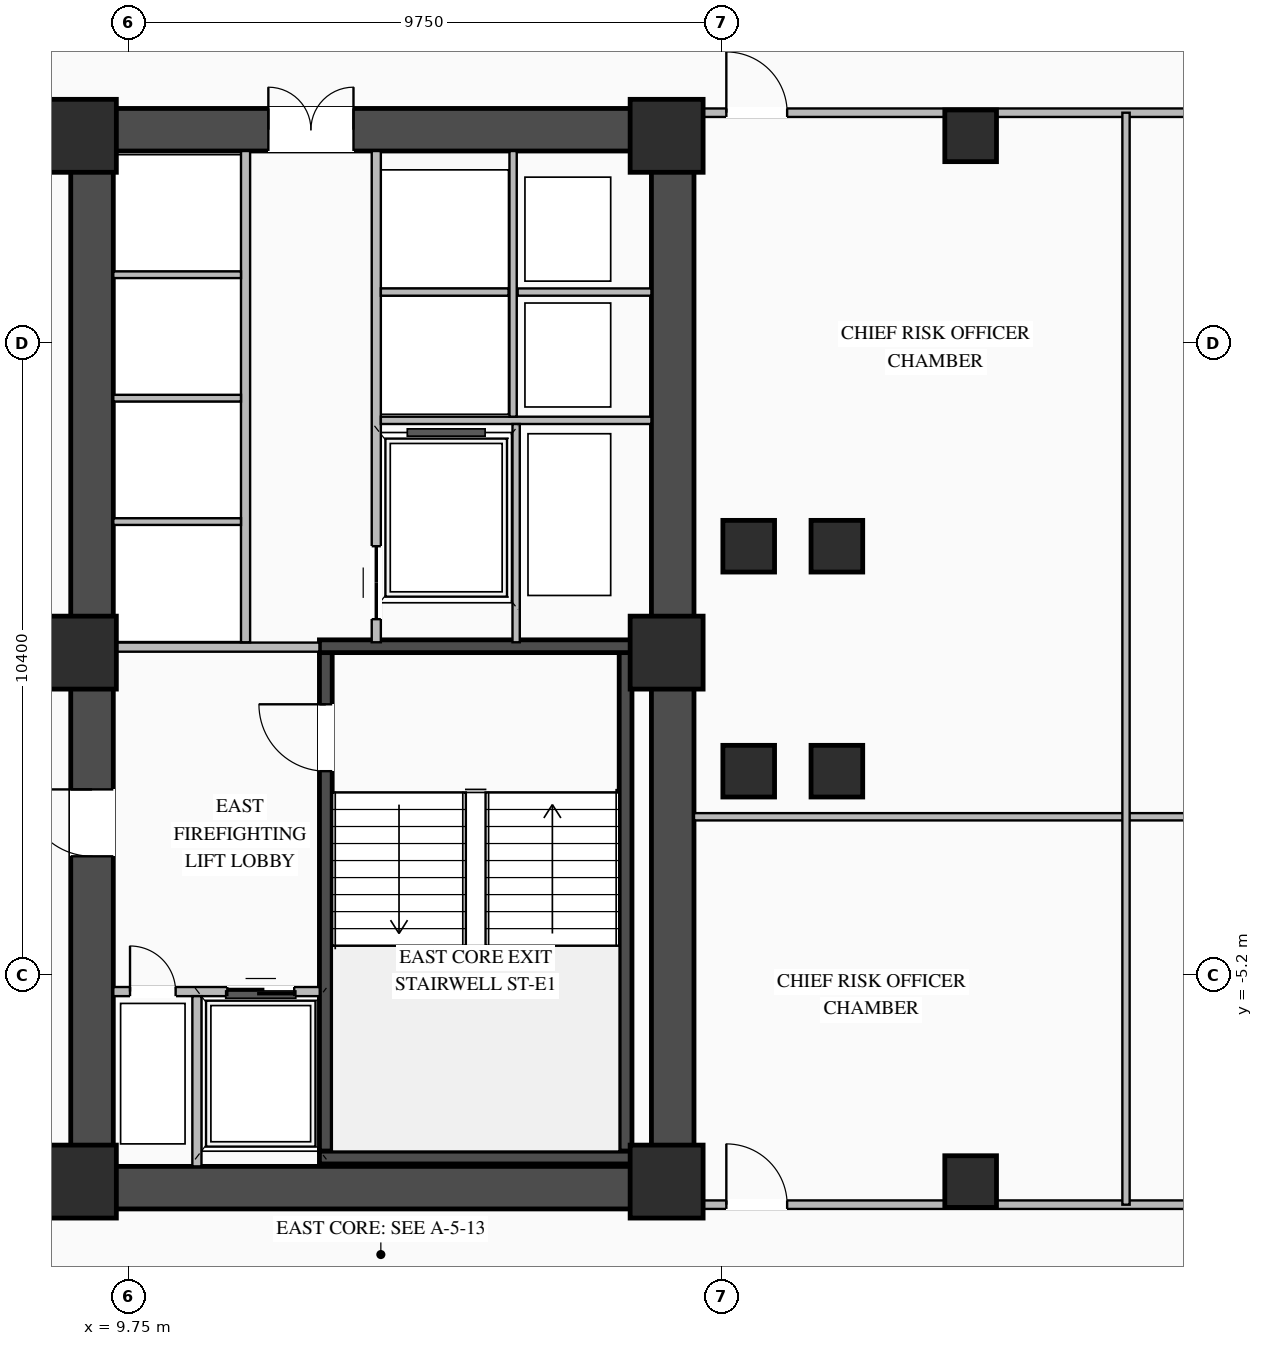
"""IFC4 building model, lengths in metres.
Left out: names, types, materials, properties, quantities, classifications, styles, units other than length and angle.
Written with IfcOpenShell. Run it as: python <this file> out.ifc"""

import sys

from ifc_helpers import new_model, si_unit, direction, frame, frame_2d, origin, origin_2d, place, context, subcontext, project, spatial, rectangle, i_section, extrude, element, fill, save


model = new_model("IFC4")
c1 = context("Model", 3, precision=1e-05, world=origin(), true_north=direction((0.0, 1.0)))
c2 = subcontext(c1, "Body", "Model", "MODEL_VIEW")
j1 = project(units=[si_unit("LENGTHUNIT", "METRE"), si_unit("PLANEANGLEUNIT", "RADIAN")], contexts=[c1])
p1 = place(None, origin())
s1 = spatial("IfcSite", under=j1, at=p1, CompositionType="ELEMENT")
p2 = place(p1, origin())
s2 = spatial("IfcBuilding", under=s1, at=p2, CompositionType="ELEMENT")
p3 = place(p2, frame((0.0, 0.0, 58.8)))
s3 = spatial("IfcBuildingStorey", under=s2, at=p3, CompositionType="ELEMENT", Elevation=58.8)
p4 = place(p3, frame((8.8, -8.7, 0.0), z_axis=(0.0, 0.0, 1.0), x_axis=(1.0, 0.0, 0.0)))
e1 = element("IfcWall", 1, at=p4, inside=s3, PredefinedType="SHEAR", context=c2, shape_type="SweptSolid", body=[
    extrude(rectangle(XDim=10.25, YDim=0.7, at=frame_2d((5.125, 0.0))), origin(), (0.0, 0.0, 1.0), 3.27),
])
p5 = place(p3, frame((8.8, 8.7, 0.0), z_axis=(0.0, 0.0, 1.0), x_axis=(1.0, 0.0, 0.0)))
e2 = element("IfcWall", 2, at=p5, inside=s3, PredefinedType="SHEAR", context=c2, shape_type="SweptSolid", body=[
    extrude(rectangle(XDim=10.25, YDim=0.7, at=frame_2d((5.125, 0.0))), origin(), (0.0, 0.0, 1.0), 3.27),
])
p6 = place(p5, frame((3.25, 0.0, 0.0)))
e3 = element("IfcOpeningElement", 3, at=p6, cuts=e2, PredefinedType="OPENING", context=c2, shape_type="SweptSolid", body=[
    extrude(rectangle(XDim=1.4, YDim=2.05, at=frame_2d((0.7, 1.025))), frame((0.0, 0.36, 0.0), z_axis=(0.0, -1.0, 0.0), x_axis=(1.0, 0.0, 0.0)), (0.0, 0.0, 1.0), 0.72),
])
p7 = place(p3, frame((9.15, -8.35, 0.0), z_axis=(0.0, 0.0, 1.0), x_axis=(0.0, 1.0, 0.0)))
e4 = element("IfcWall", 4, at=p7, inside=s3, PredefinedType="SHEAR", context=c2, shape_type="SweptSolid", body=[
    extrude(rectangle(XDim=16.7, YDim=0.7, at=frame_2d((8.35, 0.0))), origin(), (0.0, 0.0, 1.0), 3.27),
])
p8 = place(p7, frame((5.1, 0.0, 0.0)))
e5 = element("IfcOpeningElement", 5, at=p8, cuts=e4, PredefinedType="OPENING", context=c2, shape_type="SweptSolid", body=[
    extrude(rectangle(XDim=1.1, YDim=2.08, at=frame_2d((0.55, 1.04))), frame((0.0, 0.36, 0.0), z_axis=(0.0, -1.0, 0.0), x_axis=(1.0, 0.0, 0.0)), (0.0, 0.0, 1.0), 0.72),
])
p9 = place(p3, frame((18.7, -8.35, 0.0), z_axis=(0.0, 0.0, 1.0), x_axis=(0.0, 1.0, 0.0)))
e6 = element("IfcWall", 6, at=p9, inside=s3, PredefinedType="SHEAR", context=c2, shape_type="SweptSolid", body=[
    extrude(rectangle(XDim=16.7, YDim=0.7, at=frame_2d((8.35, 0.0))), origin(), (0.0, 0.0, 1.0), 3.27),
])
p10 = place(p3, frame((12.995, -8.1, 0.0), z_axis=(0.0, 0.0, 1.0), x_axis=(0.0, 1.0, 0.0)))
e7 = element("IfcWall", 7, at=p10, inside=s3, PredefinedType="SHEAR", context=c2, shape_type="SweptSolid", body=[
    extrude(rectangle(XDim=8.2, YDim=0.21, at=frame_2d((4.1, 0.0))), origin(), (0.0, 0.0, 1.0), 3.27),
])
p11 = place(p10, frame((6.25, 0.0, 0.0)))
e8 = element("IfcOpeningElement", 8, at=p11, cuts=e7, PredefinedType="OPENING", context=c2, shape_type="SweptSolid", body=[
    extrude(rectangle(XDim=1.1, YDim=2.15, at=frame_2d((0.55, 1.075))), frame((0.0, 0.115, 0.0), z_axis=(0.0, -1.0, 0.0), x_axis=(1.0, 0.0, 0.0)), (0.0, 0.0, 1.0), 0.23),
])
p12 = place(p3, frame((17.925, -8.1, 0.0), z_axis=(0.0, 0.0, 1.0), x_axis=(0.0, 1.0, 0.0)))
e9 = element("IfcWall", 9, at=p12, inside=s3, PredefinedType="SHEAR", context=c2, shape_type="SweptSolid", body=[
    extrude(rectangle(XDim=8.2, YDim=0.21, at=frame_2d((4.1, 0.0))), origin(), (0.0, 0.0, 1.0), 3.27),
])
for number, where, z_axis, x_axis in (
    (10, (12.89, -8.205, 0.0), (0.0, 0.0, 1.0), (1.0, 0.0, 0.0)),
    (11, (18.03, 0.205, 0.0), (0.0, 0.0, 1.0), (-1.0, 0.0, 0.0)),
):
    element("IfcWall", number, at=place(p3, frame(where, z_axis=z_axis, x_axis=x_axis)), inside=s3, PredefinedType="SHEAR", context=c2, shape_type="SweptSolid", body=[
        extrude(rectangle(XDim=5.14, YDim=0.21, at=frame_2d((2.57, 0.0))), origin(), (0.0, 0.0, 1.0), 3.27),
    ])
for number, where, z_axis, x_axis in (
    (12, (8.95, -8.6, 0.0), (0.0, 0.0, 1.0), (1.0, 0.0, 0.0)),
    (13, (8.95, 0.1, 0.0), (0.0, 0.0, 1.0), (1.0, 0.0, 0.0)),
    (14, (8.95, 8.6, 0.0), (0.0, 0.0, 1.0), (1.0, 0.0, 0.0)),
    (15, (18.6, -8.6, 0.0), (0.0, 0.0, 1.0), (1.0, 0.0, 0.0)),
    (16, (18.6, 0.1, 0.0), (0.0, 0.0, 1.0), (1.0, 0.0, 0.0)),
    (17, (18.6, 8.6, 0.0), (0.0, 0.0, 1.0), (1.0, 0.0, 0.0)),
):
    element("IfcColumn", number, at=place(p3, frame(where, z_axis=z_axis, x_axis=x_axis)), inside=s3, PredefinedType="COLUMN", context=c2, shape_type="SweptSolid", body=[
        extrude(rectangle(XDim=1.2, YDim=1.2, at=origin_2d()), origin(), (0.0, 0.0, 1.0), 3.45),
    ])
for number, where, z_axis, x_axis in (
    (18, (19.95, -1.85, 0.0), (0.0, 0.0, 1.0), (1.0, 0.0, 0.0)),
    (19, (19.95, 1.85, 0.0), (0.0, 0.0, 1.0), (1.0, 0.0, 0.0)),
    (20, (21.4, -1.85, 0.0), (0.0, 0.0, 1.0), (1.0, 0.0, 0.0)),
    (21, (21.4, 1.85, 0.0), (0.0, 0.0, 1.0), (1.0, 0.0, 0.0)),
    (22, (23.6, -8.6, 0.0), (0.0, 0.0, 1.0), (1.0, 0.0, 0.0)),
    (23, (23.6, 8.6, 0.0), (0.0, 0.0, 1.0), (1.0, 0.0, 0.0)),
):
    element("IfcColumn", number, at=place(p3, frame(where, z_axis=z_axis, x_axis=x_axis)), inside=s3, PredefinedType="COLUMN", context=c2, shape_type="SweptSolid", body=[
        extrude(i_section(OverallWidth=0.85, OverallDepth=0.85, WebThickness=0.032, FlangeThickness=0.048, at=origin_2d()), origin(), (0.0, 0.0, 1.0), 3.45),
    ])
p13 = place(p3, frame((9.5, -5.475, 0.0), z_axis=(0.0, 0.0, 1.0), x_axis=(1.0, 0.0, 0.0)))
e24 = element("IfcWall", 24, at=p13, inside=s3, PredefinedType="STANDARD", context=c2, shape_type="SweptSolid", body=[
    extrude(rectangle(XDim=3.395, YDim=0.15, at=frame_2d((1.698, 0.0))), origin(), (0.0, 0.0, 1.0), 3.25),
])
p14 = place(p13, frame((1.875, 0.0, 0.0)))
e25 = element("IfcOpeningElement", 25, at=p14, cuts=e24, PredefinedType="OPENING", context=c2, shape_type="SweptSolid", body=[
    extrude(rectangle(XDim=1.1, YDim=2.15, at=frame_2d((0.55, 1.075))), frame((0.0, 0.085, 0.0), z_axis=(0.0, -1.0, 0.0), x_axis=(1.0, 0.0, 0.0)), (0.0, 0.0, 1.0), 0.17),
])
p15 = place(p13, frame((0.275, 0.0, 0.0)))
e26 = element("IfcOpeningElement", 26, at=p15, cuts=e24, PredefinedType="OPENING", context=c2, shape_type="SweptSolid", body=[
    extrude(rectangle(XDim=0.75, YDim=2.05, at=frame_2d((0.375, 1.025))), frame((0.0, 0.085, 0.0), z_axis=(0.0, -1.0, 0.0), x_axis=(1.0, 0.0, 0.0)), (0.0, 0.0, 1.0), 0.17),
])
p16 = place(p3, frame((10.875, -8.35, 0.0), z_axis=(0.0, 0.0, 1.0), x_axis=(0.0, 1.0, 0.0)))
e27 = element("IfcWall", 27, at=p16, inside=s3, PredefinedType="STANDARD", context=c2, shape_type="SweptSolid", body=[
    extrude(rectangle(XDim=2.8, YDim=0.15, at=frame_2d((1.4, 0.0))), origin(), (0.0, 0.0, 1.0), 3.25),
])
p17 = place(p3, frame((9.5, 0.19, 0.0), z_axis=(0.0, 0.0, 1.0), x_axis=(1.0, 0.0, 0.0)))
e28 = element("IfcWall", 28, at=p17, inside=s3, PredefinedType="STANDARD", context=c2, shape_type="SweptSolid", body=[
    extrude(rectangle(XDim=3.39, YDim=0.15, at=frame_2d((1.695, 0.0))), origin(), (0.0, 0.0, 1.0), 2.645),
])
p18 = place(p3, frame((11.675, 0.27, 0.0), z_axis=(0.0, 0.0, 1.0), x_axis=(0.0, 1.0, 0.0)))
e29 = element("IfcWall", 29, at=p18, inside=s3, PredefinedType="STANDARD", context=c2, shape_type="SweptSolid", body=[
    extrude(rectangle(XDim=8.08, YDim=0.15, at=frame_2d((4.04, 0.0))), origin(), (0.0, 0.0, 1.0), 3.25),
])
for number, where, z_axis, x_axis in (
    (30, (9.5, 2.255, 0.0), (0.0, 0.0, 1.0), (1.0, 0.0, 0.0)),
    (31, (9.5, 4.285, 0.0), (0.0, 0.0, 1.0), (1.0, 0.0, 0.0)),
    (32, (9.5, 6.315, 0.0), (0.0, 0.0, 1.0), (1.0, 0.0, 0.0)),
):
    element("IfcWall", number, at=place(p3, frame(where, z_axis=z_axis, x_axis=x_axis)), inside=s3, PredefinedType="STANDARD", context=c2, shape_type="SweptSolid", body=[
        extrude(rectangle(XDim=2.1, YDim=0.11, at=frame_2d((1.05, 0.0))), origin(), (0.0, 0.0, 1.0), 3.25),
    ])
p19 = place(p3, frame((13.825, 0.27, 0.0), z_axis=(0.0, 0.0, 1.0), x_axis=(0.0, 1.0, 0.0)))
e33 = element("IfcWall", 33, at=p19, inside=s3, PredefinedType="STANDARD", context=c2, shape_type="SweptSolid", body=[
    extrude(rectangle(XDim=8.08, YDim=0.15, at=frame_2d((4.04, 0.0))), origin(), (0.0, 0.0, 1.0), 3.25),
])
p20 = place(p19, frame((0.38, 0.0, 0.0)))
e34 = element("IfcOpeningElement", 34, at=p20, cuts=e33, PredefinedType="OPENING", context=c2, shape_type="SweptSolid", body=[
    extrude(rectangle(XDim=1.2, YDim=2.1, at=frame_2d((0.6, 1.05))), frame((0.0, 0.085, 0.0), z_axis=(0.0, -1.0, 0.0), x_axis=(1.0, 0.0, 0.0)), (0.0, 0.0, 1.0), 0.17),
])
p21 = place(p3, frame((13.9, 3.92, 0.0), z_axis=(0.0, 0.0, 1.0), x_axis=(1.0, 0.0, 0.0)))
e35 = element("IfcWall", 35, at=p21, inside=s3, PredefinedType="STANDARD", context=c2, shape_type="SweptSolid", body=[
    extrude(rectangle(XDim=4.45, YDim=0.12, at=frame_2d((2.225, 0.0))), origin(), (0.0, 0.0, 1.0), 3.25),
])
p22 = place(p3, frame((16.15, 6.03, 0.0), z_axis=(0.0, 0.0, 1.0), x_axis=(1.0, 0.0, 0.0)))
e36 = element("IfcWall", 36, at=p22, inside=s3, PredefinedType="STANDARD", context=c2, shape_type="SweptSolid", body=[
    extrude(rectangle(XDim=2.2, YDim=0.12, at=frame_2d((1.1, 0.0))), origin(), (0.0, 0.0, 1.0), 3.25),
])
p23 = place(p3, frame((16.075, 3.98, 0.0), z_axis=(0.0, 0.0, 1.0), x_axis=(0.0, 1.0, 0.0)))
e37 = element("IfcWall", 37, at=p23, inside=s3, PredefinedType="STANDARD", context=c2, shape_type="SweptSolid", body=[
    extrude(rectangle(XDim=4.37, YDim=0.12, at=frame_2d((2.185, 0.0))), origin(), (0.0, 0.0, 1.0), 3.25),
])
p24 = place(p3, frame((13.9, 6.03, 0.0), z_axis=(0.0, 0.0, 1.0), x_axis=(1.0, 0.0, 0.0)))
e38 = element("IfcWall", 38, at=p24, inside=s3, PredefinedType="STANDARD", context=c2, shape_type="SweptSolid", body=[
    extrude(rectangle(XDim=2.1, YDim=0.12, at=frame_2d((1.05, 0.0))), origin(), (0.0, 0.0, 1.0), 3.25),
])
p25 = place(p3, frame((16.125, 0.27, 0.0), z_axis=(0.0, 0.0, 1.0), x_axis=(0.0, 1.0, 0.0)))
e39 = element("IfcWall", 39, at=p25, inside=s3, PredefinedType="STANDARD", context=c2, shape_type="SweptSolid", body=[
    extrude(rectangle(XDim=3.59, YDim=0.12, at=frame_2d((1.795, 0.0))), origin(), (0.0, 0.0, 1.0), 3.25),
])
p26 = place(p3, frame((19.05, 8.98, 0.0), z_axis=(0.0, 0.0, 1.0), x_axis=(1.0, 0.0, 0.0)))
e40 = element("IfcWall", 40, at=p26, inside=s3, PredefinedType="STANDARD", context=c2, shape_type="SweptSolid", body=[
    extrude(rectangle(XDim=16.57, YDim=0.14, at=frame_2d((8.285, 0.0))), origin(), (0.0, 0.0, 1.0), 3.25),
])
p27 = place(p26, frame((0.532, 0.0, 0.0)))
e41 = element("IfcOpeningElement", 41, at=p27, cuts=e40, PredefinedType="OPENING", context=c2, shape_type="SweptSolid", body=[
    extrude(rectangle(XDim=1.0, YDim=2.08, at=frame_2d((0.5, 1.04))), frame((0.0, 0.08, 0.0), z_axis=(0.0, -1.0, 0.0), x_axis=(1.0, 0.0, 0.0)), (0.0, 0.0, 1.0), 0.16),
])
p28 = place(p26, frame((11.208, 0.0, 0.0)))
e42 = element("IfcOpeningElement", 42, at=p28, cuts=e40, PredefinedType="OPENING", context=c2, shape_type="SweptSolid", body=[
    extrude(rectangle(XDim=1.0, YDim=2.08, at=frame_2d((0.5, 1.04))), frame((0.0, 0.08, 0.0), z_axis=(0.0, -1.0, 0.0), x_axis=(1.0, 0.0, 0.0)), (0.0, 0.0, 1.0), 0.16),
])
p29 = place(p3, frame((19.05, -8.98, 0.0), z_axis=(0.0, 0.0, 1.0), x_axis=(1.0, 0.0, 0.0)))
e43 = element("IfcWall", 43, at=p29, inside=s3, PredefinedType="STANDARD", context=c2, shape_type="SweptSolid", body=[
    extrude(rectangle(XDim=16.57, YDim=0.14, at=frame_2d((8.285, 0.0))), origin(), (0.0, 0.0, 1.0), 3.25),
])
p30 = place(p29, frame((0.532, 0.0, 0.0)))
e44 = element("IfcOpeningElement", 44, at=p30, cuts=e43, PredefinedType="OPENING", context=c2, shape_type="SweptSolid", body=[
    extrude(rectangle(XDim=1.0, YDim=2.08, at=frame_2d((0.5, 1.04))), frame((0.0, 0.08, 0.0), z_axis=(0.0, -1.0, 0.0), x_axis=(1.0, 0.0, 0.0)), (0.0, 0.0, 1.0), 0.16),
])
p31 = place(p29, frame((11.208, 0.0, 0.0)))
e45 = element("IfcOpeningElement", 45, at=p31, cuts=e43, PredefinedType="OPENING", context=c2, shape_type="SweptSolid", body=[
    extrude(rectangle(XDim=1.0, YDim=2.08, at=frame_2d((0.5, 1.04))), frame((0.0, 0.08, 0.0), z_axis=(0.0, -1.0, 0.0), x_axis=(1.0, 0.0, 0.0)), (0.0, 0.0, 1.0), 0.16),
])
p32 = place(p3, frame((19.05, -2.6, 0.0), z_axis=(0.0, 0.0, 1.0), x_axis=(1.0, 0.0, 0.0)))
e46 = element("IfcWall", 46, at=p32, inside=s3, PredefinedType="STANDARD", context=c2, shape_type="SweptSolid", body=[
    extrude(rectangle(XDim=16.57, YDim=0.12, at=frame_2d((8.285, 0.0))), origin(), (0.0, 0.0, 1.0), 3.25),
])
p33 = place(p3, frame((26.155, -8.98, 0.0), z_axis=(0.0, 0.0, 1.0), x_axis=(0.0, 1.0, 0.0)))
e47 = element("IfcWall", 47, at=p33, inside=s3, PredefinedType="STANDARD", context=c2, shape_type="SweptSolid", body=[
    extrude(rectangle(XDim=17.96, YDim=0.12, at=frame_2d((8.98, 0.0))), origin(), (0.0, 0.0, 1.0), 3.25),
])
p34 = place(p11, origin())
e48 = element("IfcDoor", 48, at=p34, inside=s3, OperationType="SINGLE_SWING_RIGHT", PredefinedType="DOOR", context=c2, shape_type="SweptSolid", body=[
    extrude(rectangle(XDim=1.1, YDim=2.15, at=frame_2d((0.55, 1.075))), frame((0.0, 0.025, 0.0), z_axis=(0.0, -1.0, 0.0), x_axis=(1.0, 0.0, 0.0)), (0.0, 0.0, 1.0), 0.05),
])
fill(e8, e48)
p35 = place(p14, origin())
e49 = element("IfcDoor", 49, at=p35, inside=s3, OperationType="DOUBLE_DOOR_SLIDING", PredefinedType="DOOR", context=c2, shape_type="SweptSolid", body=[
    extrude(rectangle(XDim=1.1, YDim=2.15, at=frame_2d((0.55, 1.075))), frame((0.0, 0.025, 0.0), z_axis=(0.0, -1.0, 0.0), x_axis=(1.0, 0.0, 0.0)), (0.0, 0.0, 1.0), 0.05),
])
fill(e25, e49)
p36 = place(p15, origin())
e50 = element("IfcDoor", 50, at=p36, inside=s3, OperationType="SINGLE_SWING_LEFT", PredefinedType="DOOR", context=c2, shape_type="SweptSolid", body=[
    extrude(rectangle(XDim=0.75, YDim=2.05, at=frame_2d((0.375, 1.025))), frame((0.0, 0.025, 0.0), z_axis=(0.0, -1.0, 0.0), x_axis=(1.0, 0.0, 0.0)), (0.0, 0.0, 1.0), 0.05),
])
fill(e26, e50)
p37 = place(p8, origin())
e51 = element("IfcDoor", 51, at=p37, inside=s3, OperationType="SINGLE_SWING_RIGHT", PredefinedType="DOOR", context=c2, shape_type="SweptSolid", body=[
    extrude(rectangle(XDim=1.1, YDim=2.08, at=frame_2d((0.55, 1.04))), frame((0.0, -0.255, 0.0), z_axis=(0.0, -1.0, 0.0), x_axis=(1.0, 0.0, 0.0)), (0.0, 0.0, 1.0), 0.05),
])
fill(e5, e51)
p38 = place(p6, origin())
e52 = element("IfcDoor", 52, at=p38, inside=s3, OperationType="DOUBLE_DOOR_SINGLE_SWING", PredefinedType="DOOR", context=c2, shape_type="SweptSolid", body=[
    extrude(rectangle(XDim=1.4, YDim=2.05, at=frame_2d((0.7, 1.025))), frame((0.0, 0.295, 0.0), z_axis=(0.0, -1.0, 0.0), x_axis=(1.0, 0.0, 0.0)), (0.0, 0.0, 1.0), 0.05),
])
fill(e3, e52)
p39 = place(p20, origin())
e53 = element("IfcDoor", 53, at=p39, inside=s3, OperationType="DOUBLE_DOOR_SLIDING", PredefinedType="DOOR", context=c2, shape_type="SweptSolid", body=[
    extrude(rectangle(XDim=1.2, YDim=2.1, at=frame_2d((0.6, 1.05))), frame((0.0, 0.025, 0.0), z_axis=(0.0, -1.0, 0.0), x_axis=(1.0, 0.0, 0.0)), (0.0, 0.0, 1.0), 0.05),
])
fill(e34, e53)
p40 = place(p27, origin())
e54 = element("IfcDoor", 54, at=p40, inside=s3, OperationType="SINGLE_SWING_LEFT", PredefinedType="DOOR", context=c2, shape_type="SweptSolid", body=[
    extrude(rectangle(XDim=1.0, YDim=2.08, at=frame_2d((0.5, 1.04))), frame((0.0, 0.025, 0.0), z_axis=(0.0, -1.0, 0.0), x_axis=(1.0, 0.0, 0.0)), (0.0, 0.0, 1.0), 0.05),
])
fill(e41, e54)
p41 = place(p30, origin())
e55 = element("IfcDoor", 55, at=p41, inside=s3, OperationType="SINGLE_SWING_LEFT", PredefinedType="DOOR", context=c2, shape_type="SweptSolid", body=[
    extrude(rectangle(XDim=1.0, YDim=2.08, at=frame_2d((0.5, 1.04))), frame((0.0, 0.025, 0.0), z_axis=(0.0, -1.0, 0.0), x_axis=(1.0, 0.0, 0.0)), (0.0, 0.0, 1.0), 0.05),
])
fill(e44, e55)
save(model, sys.argv[1])
